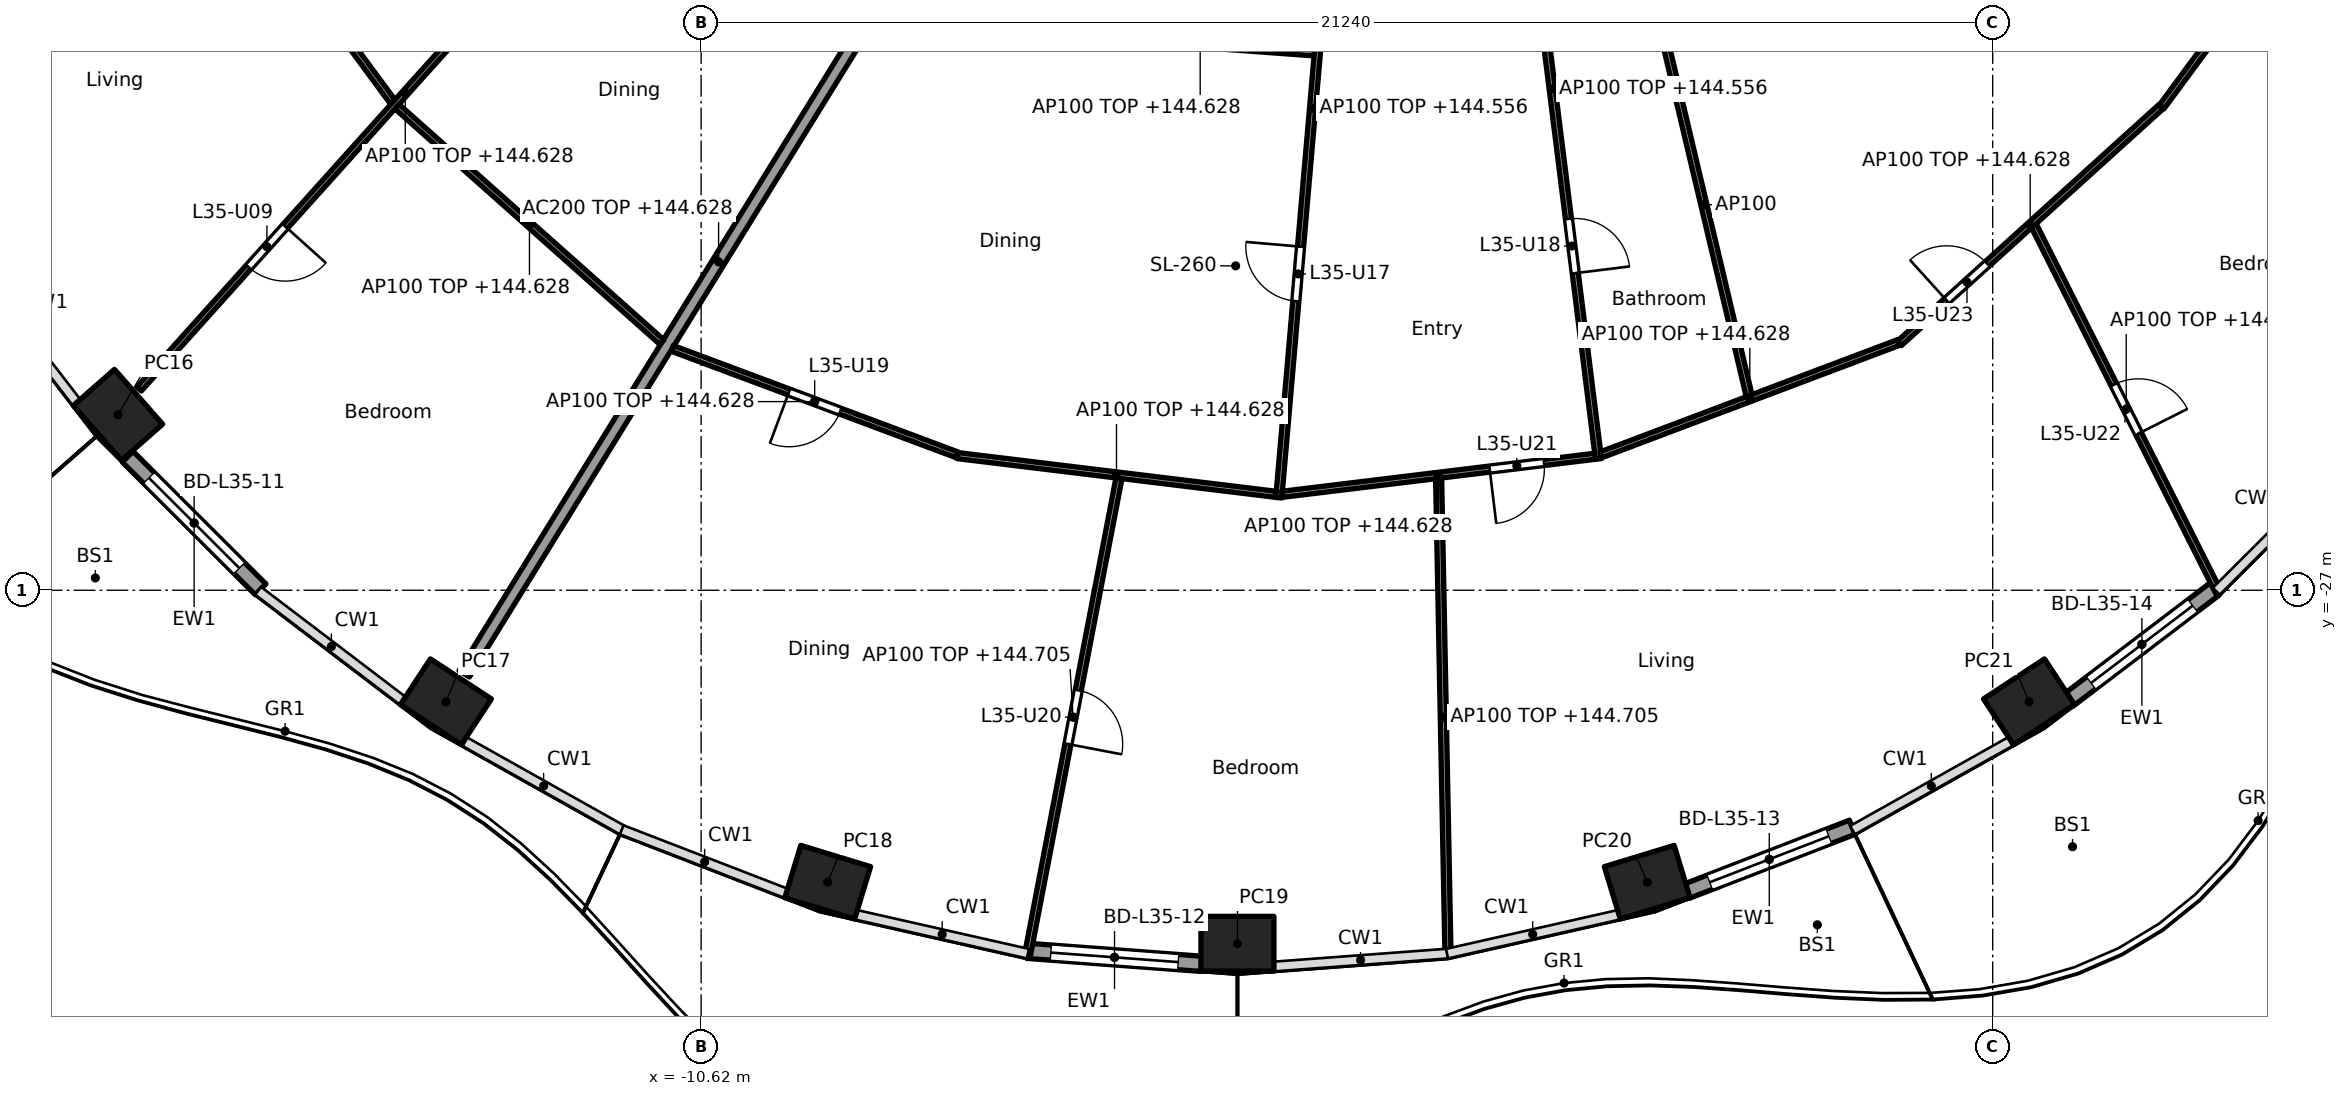
"""IFC4 building model, lengths in metres.
Left out: names, types, materials, properties, quantities, classifications, styles, units other than length and angle.
Written with IfcOpenShell. Run it as: python <this file> out.ifc"""

import sys

from ifc_helpers import new_model, si_unit, direction, frame, frame_2d, origin, origin_2d, place, context, subcontext, project, spatial, rectangle, hollow_rectangle, extrude, element, fill, save


model = new_model("IFC4")
c1 = context("Model", 3, precision=1e-05, world=origin(), true_north=direction((0.0, 1.0)))
c2 = subcontext(c1, "Body", "Model", "MODEL_VIEW")
j1 = project(units=[si_unit("LENGTHUNIT", "METRE"), si_unit("PLANEANGLEUNIT", "RADIAN")], contexts=[c1])
p1 = place(None, origin())
s1 = spatial("IfcSite", under=j1, at=p1, CompositionType="ELEMENT")
p2 = place(p1, origin())
s2 = spatial("IfcBuilding", under=s1, at=p2, CompositionType="ELEMENT")
p3 = place(p2, frame((0.0, 0.0, 141.8)))
s3 = spatial("IfcBuildingStorey", under=s2, at=p3, CompositionType="ELEMENT", Elevation=141.8)
for number, where, z_axis, x_axis in (
    (1, (-20.209, -24.115, 0.0), (0.0, 0.0, 1.0), (0.66, -0.751, 0.0)),
    (2, (-14.817, -28.834, 0.0), (0.0, 0.0, 1.0), (0.836, -0.549, 0.0)),
    (3, (-8.538, -31.801, 0.0), (0.0, 0.0, 1.0), (0.957, -0.292, 0.0)),
    (4, (-1.8, -32.813, 0.0), (0.0, 0.0, 1.0), (1.0, 0.0, 0.0)),
    (5, (4.938, -31.801, 0.0), (0.0, 0.0, 1.0), (0.957, 0.292, 0.0)),
    (6, (11.218, -28.834, 0.0), (0.0, 0.0, 1.0), (0.836, 0.549, 0.0)),
):
    element("IfcColumn", number, at=place(p3, frame(where, z_axis=z_axis, x_axis=x_axis)), inside=s3, PredefinedType="COLUMN", context=c2, shape_type="SweptSolid", body=[
        extrude(hollow_rectangle(XDim=1.2, YDim=0.9, WallThickness=0.04, at=origin_2d()), origin(), (0.0, 0.0, 1.0), 3.7),
    ])
p4 = place(p3, frame((-17.865, -26.985, 0.0), z_axis=(0.0, 0.0, 1.0), x_axis=(-0.707818274975, 0.706394570768, 0.0)))
e7 = element("IfcWall", 7, at=p4, inside=s3, PredefinedType="SOLIDWALL", context=c2, shape_type="SweptSolid", body=[
    extrude(rectangle(XDim=3.087, YDim=0.25, at=frame_2d((1.543, 0.0))), origin(), (0.0, 0.0, 1.0), 3.44),
])
p5 = place(p4, frame((0.493, 0.0, 0.0)))
e8 = element("IfcOpeningElement", 8, at=p5, cuts=e7, PredefinedType="OPENING", context=c2, shape_type="SweptSolid", body=[
    extrude(rectangle(XDim=2.1, YDim=2.4, at=frame_2d((1.05, 1.2))), frame((0.0, 0.135, 0.0), z_axis=(0.0, -1.0, 0.0), x_axis=(1.0, 0.0, 0.0)), (0.0, 0.0, 1.0), 0.27),
])
p6 = place(p3, frame((-2.389, -33.143, 0.0), z_axis=(0.0, 0.0, 1.0), x_axis=(-0.997231697044, 0.074356858535, 0.0)))
e9 = element("IfcWall", 9, at=p6, inside=s3, PredefinedType="SOLIDWALL", context=c2, shape_type="SweptSolid", body=[
    extrude(rectangle(XDim=2.873, YDim=0.25, at=frame_2d((1.437, 0.0))), origin(), (0.0, 0.0, 1.0), 3.44),
])
p7 = place(p6, frame((0.386, 0.0, 0.0)))
e10 = element("IfcOpeningElement", 10, at=p7, cuts=e9, PredefinedType="OPENING", context=c2, shape_type="SweptSolid", body=[
    extrude(rectangle(XDim=2.1, YDim=2.4, at=frame_2d((1.05, 1.2))), frame((0.0, 0.135, 0.0), z_axis=(0.0, -1.0, 0.0), x_axis=(1.0, 0.0, 0.0)), (0.0, 0.0, 1.0), 0.27),
])
p8 = place(p3, frame((8.31, -30.898, 0.0), z_axis=(0.0, 0.0, 1.0), x_axis=(-0.932845344347, -0.360277064952, 0.0)))
e11 = element("IfcWall", 11, at=p8, inside=s3, PredefinedType="SOLIDWALL", context=c2, shape_type="SweptSolid", body=[
    extrude(rectangle(XDim=2.923, YDim=0.25, at=frame_2d((1.462, 0.0))), origin(), (0.0, 0.0, 1.0), 3.44),
])
p9 = place(p8, frame((0.412, 0.0, 0.0)))
e12 = element("IfcOpeningElement", 12, at=p9, cuts=e11, PredefinedType="OPENING", context=c2, shape_type="SweptSolid", body=[
    extrude(rectangle(XDim=2.1, YDim=2.4, at=frame_2d((1.05, 1.2))), frame((0.0, 0.135, 0.0), z_axis=(0.0, -1.0, 0.0), x_axis=(1.0, 0.0, 0.0)), (0.0, 0.0, 1.0), 0.27),
])
p10 = place(p3, frame((14.278, -26.973, 0.0), z_axis=(0.0, 0.0, 1.0), x_axis=(-0.796022231079, -0.605267385233, 0.0)))
e13 = element("IfcWall", 13, at=p10, inside=s3, PredefinedType="SOLIDWALL", context=c2, shape_type="SweptSolid", body=[
    extrude(rectangle(XDim=3.026, YDim=0.25, at=frame_2d((1.513, 0.0))), origin(), (0.0, 0.0, 1.0), 3.44),
])
p11 = place(p10, frame((0.463, 0.0, 0.0)))
e14 = element("IfcOpeningElement", 14, at=p11, cuts=e13, PredefinedType="OPENING", context=c2, shape_type="SweptSolid", body=[
    extrude(rectangle(XDim=2.1, YDim=2.4, at=frame_2d((1.05, 1.2))), frame((0.0, 0.135, 0.0), z_axis=(0.0, -1.0, 0.0), x_axis=(1.0, 0.0, 0.0)), (0.0, 0.0, 1.0), 0.27),
])
p12 = place(p3, frame((-6.149, -14.825, 0.0), z_axis=(0.0, 0.0, 1.0), x_axis=(-0.525406383516, -0.85085141603, 0.0)))
e15 = element("IfcWall", 15, at=p12, inside=s3, PredefinedType="PARTITIONING", context=c2, shape_type="SweptSolid", body=[
    extrude(rectangle(XDim=15.925, YDim=0.2, at=frame_2d((7.962, 0.0))), origin(), (0.0, 0.0, 1.0), 2.828),
])
p13 = place(p3, frame((-19.176, -14.244, 0.0), z_axis=(0.0, 0.0, 1.0), x_axis=(0.593532053206, -0.80481035146, 0.0)))
e16 = element("IfcWall", 16, at=p13, inside=s3, PredefinedType="PARTITIONING", context=c2, shape_type="SweptSolid", body=[
    extrude(rectangle(XDim=5.876, YDim=0.1, at=frame_2d((2.938, 0.0))), origin(), (0.0, 0.0, 1.0), 2.828),
])
p14 = place(p3, frame((-11.109, -13.951, 0.0), z_axis=(0.0, 0.0, 1.0), x_axis=(-0.668488676691, -0.743722319913, 0.0)))
e17 = element("IfcWall", 17, at=p14, inside=s3, PredefinedType="PARTITIONING", context=c2, shape_type="SweptSolid", body=[
    extrude(rectangle(XDim=13.094, YDim=0.1, at=frame_2d((6.547, 0.0))), origin(), (0.0, 0.0, 1.0), 2.828),
])
p15 = place(p14, frame((9.5, 0.0, 0.0)))
e18 = element("IfcOpeningElement", 18, at=p15, cuts=e17, PredefinedType="OPENING", context=c2, shape_type="SweptSolid", body=[
    extrude(rectangle(XDim=0.9, YDim=2.1, at=frame_2d((0.45, 1.05))), frame((0.0, 0.06, 0.0), z_axis=(0.0, -1.0, 0.0), x_axis=(1.0, 0.0, 0.0)), (0.0, 0.0, 1.0), 0.12),
])
p16 = place(p3, frame((-15.622, -19.046, 0.0), z_axis=(0.0, 0.0, 1.0), x_axis=(0.747342322463, -0.664439201925, 0.0)))
e19 = element("IfcWall", 19, at=p16, inside=s3, PredefinedType="PARTITIONING", context=c2, shape_type="SweptSolid", body=[
    extrude(rectangle(XDim=5.831, YDim=0.1, at=frame_2d((2.916, 0.0))), origin(), (0.0, 0.0, 1.0), 2.828),
])
p17 = place(p3, frame((-11.096, -23.022, 0.0), z_axis=(0.0, 0.0, 1.0), x_axis=(0.936725688471, -0.350064257758, 0.0)))
e20 = element("IfcWall", 20, at=p17, inside=s3, PredefinedType="PARTITIONING", context=c2, shape_type="SweptSolid", body=[
    extrude(rectangle(XDim=5.003, YDim=0.1, at=frame_2d((2.501, 0.0))), origin(), (0.0, 0.0, 1.0), 2.828),
])
p18 = place(p17, frame((2.051, 0.0, 0.0)))
e21 = element("IfcOpeningElement", 21, at=p18, cuts=e20, PredefinedType="OPENING", context=c2, shape_type="SweptSolid", body=[
    extrude(rectangle(XDim=0.9, YDim=2.1, at=frame_2d((0.45, 1.05))), frame((0.0, 0.06, 0.0), z_axis=(0.0, -1.0, 0.0), x_axis=(1.0, 0.0, 0.0)), (0.0, 0.0, 1.0), 0.12),
])
p19 = place(p3, frame((-4.29, -17.885, 0.0), z_axis=(0.0, 0.0, 1.0), x_axis=(0.997272353708, -0.073809569363, 0.0)))
e22 = element("IfcWall", 22, at=p19, inside=s3, PredefinedType="PARTITIONING", context=c2, shape_type="SweptSolid", body=[
    extrude(rectangle(XDim=3.764, YDim=0.1, at=frame_2d((1.882, 0.0))), origin(), (0.0, 0.0, 1.0), 2.828),
])
p20 = place(p3, frame((-6.413, -24.784, 0.0), z_axis=(0.0, 0.0, 1.0), x_axis=(0.992690077723, -0.120691381588, 0.0)))
e23 = element("IfcWall", 23, at=p20, inside=s3, PredefinedType="PARTITIONING", context=c2, shape_type="SweptSolid", body=[
    extrude(rectangle(XDim=5.286, YDim=0.1, at=frame_2d((2.643, 0.0))), origin(), (0.0, 0.0, 1.0), 2.828),
])
p21 = place(p3, frame((-3.749, -25.159, 0.0), z_axis=(0.0, 0.0, 1.0), x_axis=(-0.188392334675, -0.982093848996, 0.0)))
e24 = element("IfcWall", 24, at=p21, inside=s3, PredefinedType="PARTITIONING", context=c2, shape_type="SweptSolid", body=[
    extrude(rectangle(XDim=8.0, YDim=0.1, at=frame_2d((4.0, 0.0))), origin(), (0.0, 0.0, 1.0), 2.905),
])
p22 = place(p21, frame((3.55, 0.0, 0.0)))
e25 = element("IfcOpeningElement", 25, at=p22, cuts=e24, PredefinedType="OPENING", context=c2, shape_type="SweptSolid", body=[
    extrude(rectangle(XDim=0.9, YDim=2.1, at=frame_2d((0.45, 1.05))), frame((0.0, 0.06, 0.0), z_axis=(0.0, -1.0, 0.0), x_axis=(1.0, 0.0, 0.0)), (0.0, 0.0, 1.0), 0.12),
])
p23 = place(p3, frame((-0.009, -12.664, 0.0), z_axis=(0.0, 0.0, 1.0), x_axis=(-0.086441225464, -0.996256952066, 0.0)))
e26 = element("IfcWall", 26, at=p23, inside=s3, PredefinedType="PARTITIONING", context=c2, shape_type="SweptSolid", body=[
    extrude(rectangle(XDim=12.862, YDim=0.1, at=frame_2d((6.431, 0.0))), origin(), (0.0, 0.0, 1.0), 2.756),
])
p24 = place(p23, frame((2.312, 0.0, 0.0)))
e27 = element("IfcOpeningElement", 27, at=p24, cuts=e26, PredefinedType="OPENING", context=c2, shape_type="SweptSolid", body=[
    extrude(rectangle(XDim=0.9, YDim=2.1, at=frame_2d((0.45, 1.05))), frame((0.0, 0.06, 0.0), z_axis=(0.0, -1.0, 0.0), x_axis=(1.0, 0.0, 0.0)), (0.0, 0.0, 1.0), 0.12),
])
p25 = place(p23, frame((8.718, 0.0, 0.0)))
e28 = element("IfcOpeningElement", 28, at=p25, cuts=e26, PredefinedType="OPENING", context=c2, shape_type="SweptSolid", body=[
    extrude(rectangle(XDim=0.9, YDim=2.1, at=frame_2d((0.45, 1.05))), frame((0.0, 0.06, 0.0), z_axis=(0.0, -1.0, 0.0), x_axis=(1.0, 0.0, 0.0)), (0.0, 0.0, 1.0), 0.12),
])
p26 = place(p3, frame((-1.066, -25.422, 0.0), z_axis=(0.0, 0.0, 1.0), x_axis=(0.992692993044, 0.120667400577, 0.0)))
e29 = element("IfcWall", 29, at=p26, inside=s3, PredefinedType="PARTITIONING", context=c2, shape_type="SweptSolid", body=[
    extrude(rectangle(XDim=5.186, YDim=0.1, at=frame_2d((2.593, 0.0))), origin(), (0.0, 0.0, 1.0), 2.828),
])
p27 = place(p26, frame((3.439, 0.0, 0.0)))
e30 = element("IfcOpeningElement", 30, at=p27, cuts=e29, PredefinedType="OPENING", context=c2, shape_type="SweptSolid", body=[
    extrude(rectangle(XDim=0.9, YDim=2.1, at=frame_2d((0.45, 1.05))), frame((0.0, 0.06, 0.0), z_axis=(0.0, -1.0, 0.0), x_axis=(1.0, 0.0, 0.0)), (0.0, 0.0, 1.0), 0.12),
])
p28 = place(p3, frame((1.508, -25.159, 0.0), z_axis=(0.0, 0.0, 1.0), x_axis=(0.019670464527, -0.999806517695, 0.0)))
e31 = element("IfcWall", 31, at=p28, inside=s3, PredefinedType="PARTITIONING", context=c2, shape_type="SweptSolid", body=[
    extrude(rectangle(XDim=7.856, YDim=0.1, at=frame_2d((3.928, 0.0))), origin(), (0.0, 0.0, 1.0), 2.905),
])
p29 = place(p3, frame((2.615, -12.664, 0.0), z_axis=(0.0, 0.0, 1.0), x_axis=(0.124051875784, -0.992275733914, 0.0)))
e32 = element("IfcWall", 32, at=p29, inside=s3, PredefinedType="PARTITIONING", context=c2, shape_type="SweptSolid", body=[
    extrude(rectangle(XDim=12.271, YDim=0.1, at=frame_2d((6.135, 0.0))), origin(), (0.0, 0.0, 1.0), 2.756),
])
p30 = place(p29, frame((2.183, 0.0, 0.0)))
e33 = element("IfcOpeningElement", 33, at=p30, cuts=e32, PredefinedType="OPENING", context=c2, shape_type="SweptSolid", body=[
    extrude(rectangle(XDim=0.9, YDim=2.1, at=frame_2d((0.45, 1.05))), frame((0.0, 0.06, 0.0), z_axis=(0.0, -1.0, 0.0), x_axis=(1.0, 0.0, 0.0)), (0.0, 0.0, 1.0), 0.12),
])
p31 = place(p29, frame((8.293, 0.0, 0.0)))
e34 = element("IfcOpeningElement", 34, at=p31, cuts=e32, PredefinedType="OPENING", context=c2, shape_type="SweptSolid", body=[
    extrude(rectangle(XDim=0.9, YDim=2.1, at=frame_2d((0.45, 1.05))), frame((0.0, 0.06, 0.0), z_axis=(0.0, -1.0, 0.0), x_axis=(1.0, 0.0, 0.0)), (0.0, 0.0, 1.0), 0.12),
])
p32 = place(p3, frame((4.178, -24.773, 0.0), z_axis=(0.0, 0.0, 1.0), x_axis=(0.935585145124, 0.353101169955, 0.0)))
e35 = element("IfcWall", 35, at=p32, inside=s3, PredefinedType="PARTITIONING", context=c2, shape_type="SweptSolid", body=[
    extrude(rectangle(XDim=5.233, YDim=0.1, at=frame_2d((2.617, 0.0))), origin(), (0.0, 0.0, 1.0), 2.828),
])
p33 = place(p3, frame((5.125, -17.518, 0.0), z_axis=(0.0, 0.0, 1.0), x_axis=(0.230621848401, -0.973043453829, 0.0)))
e36 = element("IfcWall", 36, at=p33, inside=s3, PredefinedType="PARTITIONING", context=c2, shape_type="SweptSolid", body=[
    extrude(rectangle(XDim=6.457, YDim=0.1, at=frame_2d((3.228, 0.0))), origin(), (0.0, 0.0, 1.0), 3.44),
])
p34 = place(p3, frame((9.084, -22.941, 0.0), z_axis=(0.0, 0.0, 1.0), x_axis=(0.741684187175, 0.670749257543, 0.0)))
e37 = element("IfcWall", 37, at=p34, inside=s3, PredefinedType="PARTITIONING", context=c2, shape_type="SweptSolid", body=[
    extrude(rectangle(XDim=5.806, YDim=0.1, at=frame_2d((2.903, 0.0))), origin(), (0.0, 0.0, 1.0), 2.828),
])
p35 = place(p34, frame((1.052, 0.0, 0.0)))
e38 = element("IfcOpeningElement", 38, at=p35, cuts=e37, PredefinedType="OPENING", context=c2, shape_type="SweptSolid", body=[
    extrude(rectangle(XDim=0.9, YDim=2.1, at=frame_2d((0.45, 1.05))), frame((0.0, 0.06, 0.0), z_axis=(0.0, -1.0, 0.0), x_axis=(1.0, 0.0, 0.0)), (0.0, 0.0, 1.0), 0.12),
])
p36 = place(p3, frame((11.296, -21.005, 0.0), z_axis=(0.0, 0.0, 1.0), x_axis=(0.44991509116, -0.893071335755, 0.0)))
e39 = element("IfcWall", 39, at=p36, inside=s3, PredefinedType="PARTITIONING", context=c2, shape_type="SweptSolid", body=[
    extrude(rectangle(XDim=6.755, YDim=0.1, at=frame_2d((3.377, 0.0))), origin(), (0.0, 0.0, 1.0), 2.905),
])
p37 = place(p36, frame((2.927, 0.0, 0.0)))
e40 = element("IfcOpeningElement", 40, at=p37, cuts=e39, PredefinedType="OPENING", context=c2, shape_type="SweptSolid", body=[
    extrude(rectangle(XDim=0.9, YDim=2.1, at=frame_2d((0.45, 1.05))), frame((0.0, 0.06, 0.0), z_axis=(0.0, -1.0, 0.0), x_axis=(1.0, 0.0, 0.0)), (0.0, 0.0, 1.0), 0.12),
])
p38 = place(p3, frame((13.397, -19.053, 0.0), z_axis=(0.0, 0.0, 1.0), x_axis=(0.593522299069, 0.804817544856, 0.0)))
e41 = element("IfcWall", 41, at=p38, inside=s3, PredefinedType="PARTITIONING", context=c2, shape_type="SweptSolid", body=[
    extrude(rectangle(XDim=5.976, YDim=0.1, at=frame_2d((2.988, 0.0))), origin(), (0.0, 0.0, 1.0), 2.828),
])
p39 = place(p3, frame((11.667, -12.287, 0.0), z_axis=(0.0, 0.0, 1.0), x_axis=(0.635618027424, -0.772003706736, 0.0)))
e42 = element("IfcWall", 42, at=p39, inside=s3, PredefinedType="PARTITIONING", context=c2, shape_type="SweptSolid", body=[
    extrude(rectangle(XDim=11.893, YDim=0.1, at=frame_2d((5.947, 0.0))), origin(), (0.0, 0.0, 1.0), 2.905),
])
p40 = place(p39, frame((2.341, 0.0, 0.0)))
e43 = element("IfcOpeningElement", 43, at=p40, cuts=e42, PredefinedType="OPENING", context=c2, shape_type="SweptSolid", body=[
    extrude(rectangle(XDim=0.9, YDim=2.1, at=frame_2d((0.45, 1.05))), frame((0.0, 0.06, 0.0), z_axis=(0.0, -1.0, 0.0), x_axis=(1.0, 0.0, 0.0)), (0.0, 0.0, 1.0), 0.12),
])
p41 = place(p5, origin())
e44 = element("IfcDoor", 44, at=p41, inside=s3, OperationType="SLIDING_TO_LEFT", PredefinedType="DOOR", context=c2, shape_type="SweptSolid", body=[
    extrude(rectangle(XDim=2.1, YDim=2.4, at=frame_2d((1.05, 1.2))), frame((0.0, 0.025, 0.0), z_axis=(0.0, -1.0, 0.0), x_axis=(1.0, 0.0, 0.0)), (0.0, 0.0, 1.0), 0.05),
])
fill(e8, e44)
p42 = place(p7, origin())
e45 = element("IfcDoor", 45, at=p42, inside=s3, OperationType="SLIDING_TO_LEFT", PredefinedType="DOOR", context=c2, shape_type="SweptSolid", body=[
    extrude(rectangle(XDim=2.1, YDim=2.4, at=frame_2d((1.05, 1.2))), frame((0.0, 0.025, 0.0), z_axis=(0.0, -1.0, 0.0), x_axis=(1.0, 0.0, 0.0)), (0.0, 0.0, 1.0), 0.05),
])
fill(e10, e45)
p43 = place(p9, origin())
e46 = element("IfcDoor", 46, at=p43, inside=s3, OperationType="SLIDING_TO_LEFT", PredefinedType="DOOR", context=c2, shape_type="SweptSolid", body=[
    extrude(rectangle(XDim=2.1, YDim=2.4, at=frame_2d((1.05, 1.2))), frame((0.0, 0.025, 0.0), z_axis=(0.0, -1.0, 0.0), x_axis=(1.0, 0.0, 0.0)), (0.0, 0.0, 1.0), 0.05),
])
fill(e12, e46)
p44 = place(p11, origin())
e47 = element("IfcDoor", 47, at=p44, inside=s3, OperationType="SLIDING_TO_LEFT", PredefinedType="DOOR", context=c2, shape_type="SweptSolid", body=[
    extrude(rectangle(XDim=2.1, YDim=2.4, at=frame_2d((1.05, 1.2))), frame((0.0, 0.025, 0.0), z_axis=(0.0, -1.0, 0.0), x_axis=(1.0, 0.0, 0.0)), (0.0, 0.0, 1.0), 0.05),
])
fill(e14, e47)
p45 = place(p15, origin())
e48 = element("IfcDoor", 48, at=p45, inside=s3, OperationType="SINGLE_SWING_LEFT", PredefinedType="DOOR", context=c2, shape_type="SweptSolid", body=[
    extrude(rectangle(XDim=0.9, YDim=2.1, at=frame_2d((0.45, 1.05))), frame((0.0, 0.025, 0.0), z_axis=(0.0, -1.0, 0.0), x_axis=(1.0, 0.0, 0.0)), (0.0, 0.0, 1.0), 0.05),
])
fill(e18, e48)
p46 = place(p25, frame((0.9, 0.0, 0.0), x_axis=(-1.0, 0.0, 0.0)))
e49 = element("IfcDoor", 49, at=p46, inside=s3, OperationType="SINGLE_SWING_RIGHT", PredefinedType="DOOR", context=c2, shape_type="SweptSolid", body=[
    extrude(rectangle(XDim=0.9, YDim=2.1, at=frame_2d((0.45, 1.05))), frame((0.0, 0.025, 0.0), z_axis=(0.0, -1.0, 0.0), x_axis=(1.0, 0.0, 0.0)), (0.0, 0.0, 1.0), 0.05),
])
fill(e28, e49)
p47 = place(p31, origin())
e50 = element("IfcDoor", 50, at=p47, inside=s3, OperationType="SINGLE_SWING_RIGHT", PredefinedType="DOOR", context=c2, shape_type="SweptSolid", body=[
    extrude(rectangle(XDim=0.9, YDim=2.1, at=frame_2d((0.45, 1.05))), frame((0.0, 0.025, 0.0), z_axis=(0.0, -1.0, 0.0), x_axis=(1.0, 0.0, 0.0)), (0.0, 0.0, 1.0), 0.05),
])
fill(e34, e50)
p48 = place(p18, frame((0.9, 0.0, 0.0), x_axis=(-1.0, 0.0, 0.0)))
e51 = element("IfcDoor", 51, at=p48, inside=s3, OperationType="SINGLE_SWING_RIGHT", PredefinedType="DOOR", context=c2, shape_type="SweptSolid", body=[
    extrude(rectangle(XDim=0.9, YDim=2.1, at=frame_2d((0.45, 1.05))), frame((0.0, 0.025, 0.0), z_axis=(0.0, -1.0, 0.0), x_axis=(1.0, 0.0, 0.0)), (0.0, 0.0, 1.0), 0.05),
])
fill(e21, e51)
p49 = place(p22, origin())
e52 = element("IfcDoor", 52, at=p49, inside=s3, OperationType="SINGLE_SWING_RIGHT", PredefinedType="DOOR", context=c2, shape_type="SweptSolid", body=[
    extrude(rectangle(XDim=0.9, YDim=2.1, at=frame_2d((0.45, 1.05))), frame((0.0, 0.025, 0.0), z_axis=(0.0, -1.0, 0.0), x_axis=(1.0, 0.0, 0.0)), (0.0, 0.0, 1.0), 0.05),
])
fill(e25, e52)
p50 = place(p27, frame((0.9, 0.0, 0.0), x_axis=(-1.0, 0.0, 0.0)))
e53 = element("IfcDoor", 53, at=p50, inside=s3, OperationType="SINGLE_SWING_RIGHT", PredefinedType="DOOR", context=c2, shape_type="SweptSolid", body=[
    extrude(rectangle(XDim=0.9, YDim=2.1, at=frame_2d((0.45, 1.05))), frame((0.0, 0.025, 0.0), z_axis=(0.0, -1.0, 0.0), x_axis=(1.0, 0.0, 0.0)), (0.0, 0.0, 1.0), 0.05),
])
fill(e30, e53)
p51 = place(p37, origin())
e54 = element("IfcDoor", 54, at=p51, inside=s3, OperationType="SINGLE_SWING_RIGHT", PredefinedType="DOOR", context=c2, shape_type="SweptSolid", body=[
    extrude(rectangle(XDim=0.9, YDim=2.1, at=frame_2d((0.45, 1.05))), frame((0.0, 0.025, 0.0), z_axis=(0.0, -1.0, 0.0), x_axis=(1.0, 0.0, 0.0)), (0.0, 0.0, 1.0), 0.05),
])
fill(e40, e54)
p52 = place(p35, origin())
e55 = element("IfcDoor", 55, at=p52, inside=s3, OperationType="SINGLE_SWING_LEFT", PredefinedType="DOOR", context=c2, shape_type="SweptSolid", body=[
    extrude(rectangle(XDim=0.9, YDim=2.1, at=frame_2d((0.45, 1.05))), frame((0.0, 0.025, 0.0), z_axis=(0.0, -1.0, 0.0), x_axis=(1.0, 0.0, 0.0)), (0.0, 0.0, 1.0), 0.05),
])
fill(e38, e55)
save(model, sys.argv[1])
